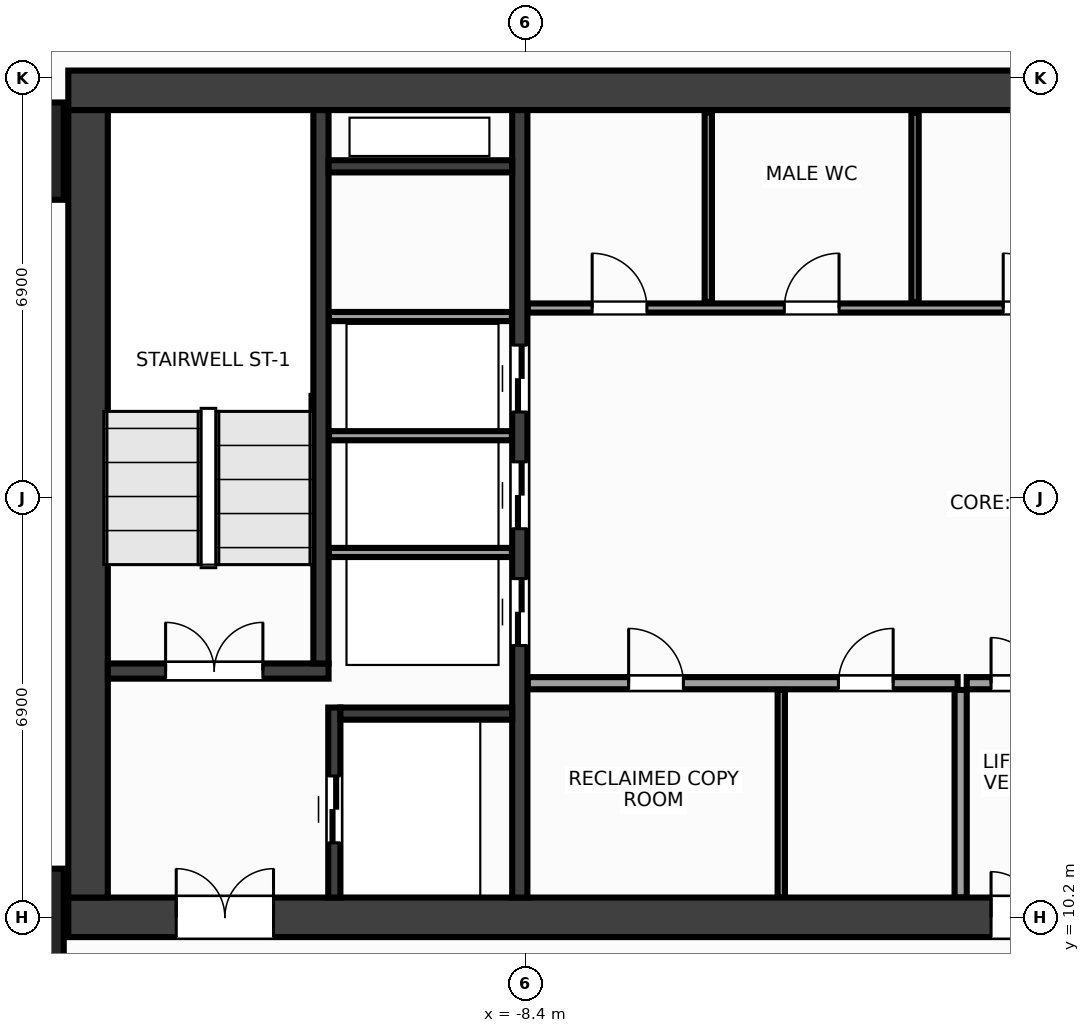
"""IFC4 building model, lengths in metres.
Left out: names, types, materials, properties, quantities, classifications, styles, units other than length and angle.
Written with IfcOpenShell. Run it as: python <this file> out.ifc"""

import sys

from ifc_helpers import new_model, si_unit, direction, frame, frame_2d, origin, origin_2d, place, context, subcontext, project, spatial, rectangle, extrude, source, transform, mapped, element, fill, save


model = new_model("IFC4")
c1 = context("Model", 3, precision=1e-05, world=origin(), true_north=direction((0.0, 1.0)))
c2 = subcontext(c1, "Body", "Model", "MODEL_VIEW")
j1 = project(units=[si_unit("LENGTHUNIT", "METRE"), si_unit("PLANEANGLEUNIT", "RADIAN")], contexts=[c1])
p1 = place(None, origin())
s1 = spatial("IfcSite", under=j1, at=p1, CompositionType="ELEMENT")
p2 = place(p1, origin())
s2 = spatial("IfcBuilding", under=s1, at=p2, CompositionType="ELEMENT")
p3 = place(p2, frame((0.0, 0.0, 164.0)))
s3 = spatial("IfcBuildingStorey", under=s2, at=p3, CompositionType="ELEMENT", Elevation=164.0)
m1 = source(origin(), c2, "Body", "SweptSolid", [
    extrude(rectangle(XDim=31.85, YDim=0.65, at=frame_2d((15.925, 0.0))), origin(), (0.0, 0.0, 1.0), 3.6),
])
p4 = place(p3, frame((-15.925, 23.8, 0.0), z_axis=(0.0, 0.0, 1.0), x_axis=(1.0, 0.0, 0.0)))
e1 = element("IfcWall", 1, at=p4, inside=s3, PredefinedType="SHEAR", context=c2, shape_type="MappedRepresentation", body=[
    mapped(m1, transform((0.0, 0.0, 0.0), x_axis=(1.0, 0.0, 0.0), y_axis=(0.0, 1.0, 0.0), z_axis=(0.0, 0.0, 1.0), scale=1.0)),
])
p5 = place(p3, frame((-15.925, 10.2, 0.0), z_axis=(0.0, 0.0, 1.0), x_axis=(1.0, 0.0, 0.0)))
e2 = element("IfcWall", 2, at=p5, inside=s3, PredefinedType="SHEAR", context=c2, shape_type="MappedRepresentation", body=[
    mapped(m1, transform((0.0, 0.0, 0.0), x_axis=(1.0, 0.0, 0.0), y_axis=(0.0, 1.0, 0.0), z_axis=(0.0, 0.0, 1.0), scale=1.0)),
])
p6 = place(p5, frame((1.775, 0.0, 0.0)))
e3 = element("IfcOpeningElement", 3, at=p6, cuts=e2, PredefinedType="OPENING", context=c2, shape_type="SweptSolid", body=[
    extrude(rectangle(XDim=1.6, YDim=2.15, at=frame_2d((0.8, 1.075))), frame((0.0, 0.337, 0.0), z_axis=(0.0, -1.0, 0.0), x_axis=(1.0, 0.0, 0.0)), (0.0, 0.0, 1.0), 0.674),
])
p7 = place(p5, frame((28.475, 0.0, 0.0)))
e4 = element("IfcOpeningElement", 4, at=p7, cuts=e2, PredefinedType="OPENING", context=c2, shape_type="SweptSolid", body=[
    extrude(rectangle(XDim=1.6, YDim=2.15, at=frame_2d((0.8, 1.075))), frame((0.0, 0.337, 0.0), z_axis=(0.0, -1.0, 0.0), x_axis=(1.0, 0.0, 0.0)), (0.0, 0.0, 1.0), 0.674),
])
p8 = place(p5, frame((15.175, 0.0, 0.0)))
e5 = element("IfcOpeningElement", 5, at=p8, cuts=e2, PredefinedType="OPENING", context=c2, shape_type="SweptSolid", body=[
    extrude(rectangle(XDim=1.5, YDim=2.2, at=frame_2d((0.75, 1.1))), frame((0.0, 0.337, 0.0), z_axis=(0.0, -1.0, 0.0), x_axis=(1.0, 0.0, 0.0)), (0.0, 0.0, 1.0), 0.674),
])
m2 = source(origin(), c2, "Body", "SweptSolid", [
    extrude(rectangle(XDim=12.95, YDim=0.65, at=frame_2d((6.475, 0.0))), origin(), (0.0, 0.0, 1.0), 3.6),
])
p9 = place(p3, frame((-15.6, 10.525, 0.0), z_axis=(0.0, 0.0, 1.0), x_axis=(0.0, 1.0, 0.0)))
e6 = element("IfcWall", 6, at=p9, inside=s3, PredefinedType="SHEAR", context=c2, shape_type="MappedRepresentation", body=[
    mapped(m2, transform((0.0, 0.0, 0.0), x_axis=(1.0, 0.0, 0.0), y_axis=(0.0, 1.0, 0.0), z_axis=(0.0, 0.0, 1.0), scale=1.0)),
])
m3 = source(origin(), c2, "Body", "SweptSolid", [
    extrude(rectangle(XDim=12.95, YDim=0.25, at=frame_2d((6.475, 0.0))), origin(), (0.0, 0.0, 1.0), 3.6),
])
p10 = place(p3, frame((-8.5, 10.525, 0.0), z_axis=(0.0, 0.0, 1.0), x_axis=(0.0, 1.0, 0.0)))
e7 = element("IfcWall", 7, at=p10, inside=s3, PredefinedType="SHEAR", context=c2, shape_type="MappedRepresentation", body=[
    mapped(m3, transform((0.0, 0.0, 0.0), x_axis=(1.0, 0.0, 0.0), y_axis=(0.0, 1.0, 0.0), z_axis=(0.0, 0.0, 1.0), scale=1.0)),
])
p11 = place(p10, frame((4.145, 0.0, 0.0)))
e8 = element("IfcOpeningElement", 8, at=p11, cuts=e7, PredefinedType="OPENING", context=c2, shape_type="SweptSolid", body=[
    extrude(rectangle(XDim=1.1, YDim=2.15, at=frame_2d((0.55, 1.075))), frame((0.0, 0.137, 0.0), z_axis=(0.0, -1.0, 0.0), x_axis=(1.0, 0.0, 0.0)), (0.0, 0.0, 1.0), 0.274),
])
p12 = place(p10, frame((6.065, 0.0, 0.0)))
e9 = element("IfcOpeningElement", 9, at=p12, cuts=e7, PredefinedType="OPENING", context=c2, shape_type="SweptSolid", body=[
    extrude(rectangle(XDim=1.1, YDim=2.15, at=frame_2d((0.55, 1.075))), frame((0.0, 0.137, 0.0), z_axis=(0.0, -1.0, 0.0), x_axis=(1.0, 0.0, 0.0)), (0.0, 0.0, 1.0), 0.274),
])
p13 = place(p10, frame((7.985, 0.0, 0.0)))
e10 = element("IfcOpeningElement", 10, at=p13, cuts=e7, PredefinedType="OPENING", context=c2, shape_type="SweptSolid", body=[
    extrude(rectangle(XDim=1.1, YDim=2.15, at=frame_2d((0.55, 1.075))), frame((0.0, 0.137, 0.0), z_axis=(0.0, -1.0, 0.0), x_axis=(1.0, 0.0, 0.0)), (0.0, 0.0, 1.0), 0.274),
])
m4 = source(origin(), c2, "Body", "SweptSolid", [
    extrude(rectangle(XDim=3.63, YDim=0.25, at=frame_2d((1.815, 0.0))), origin(), (0.0, 0.0, 1.0), 3.6),
])
p14 = place(p3, frame((-15.275, 14.25, 0.0), z_axis=(0.0, 0.0, 1.0), x_axis=(1.0, 0.0, 0.0)))
e11 = element("IfcWall", 11, at=p14, inside=s3, PredefinedType="SHEAR", context=c2, shape_type="MappedRepresentation", body=[
    mapped(m4, transform((0.0, 0.0, 0.0), x_axis=(1.0, 0.0, 0.0), y_axis=(0.0, 1.0, 0.0), z_axis=(0.0, 0.0, 1.0), scale=1.0)),
])
p15 = place(p14, frame((0.95, 0.0, 0.0)))
e12 = element("IfcOpeningElement", 12, at=p15, cuts=e11, PredefinedType="OPENING", context=c2, shape_type="SweptSolid", body=[
    extrude(rectangle(XDim=1.6, YDim=2.15, at=frame_2d((0.8, 1.075))), frame((0.0, 0.137, 0.0), z_axis=(0.0, -1.0, 0.0), x_axis=(1.0, 0.0, 0.0)), (0.0, 0.0, 1.0), 0.274),
])
m5 = source(origin(), c2, "Body", "SweptSolid", [
    extrude(rectangle(XDim=9.1, YDim=0.25, at=frame_2d((4.55, 0.0))), origin(), (0.0, 0.0, 1.0), 3.6),
])
p16 = place(p3, frame((-11.77, 14.375, 0.0), z_axis=(0.0, 0.0, 1.0), x_axis=(0.0, 1.0, 0.0)))
e13 = element("IfcWall", 13, at=p16, inside=s3, PredefinedType="SHEAR", context=c2, shape_type="MappedRepresentation", body=[
    mapped(m5, transform((0.0, 0.0, 0.0), x_axis=(1.0, 0.0, 0.0), y_axis=(0.0, 1.0, 0.0), z_axis=(0.0, 0.0, 1.0), scale=1.0)),
])
m6 = source(origin(), c2, "Body", "SweptSolid", [
    extrude(rectangle(XDim=3.125, YDim=0.2, at=frame_2d((1.562, 0.0))), origin(), (0.0, 0.0, 1.0), 3.6),
])
p17 = place(p3, frame((-11.55, 10.525, 0.0), z_axis=(0.0, 0.0, 1.0), x_axis=(0.0, 1.0, 0.0)))
e14 = element("IfcWall", 14, at=p17, inside=s3, PredefinedType="SHEAR", context=c2, shape_type="MappedRepresentation", body=[
    mapped(m6, transform((0.0, 0.0, 0.0), x_axis=(1.0, 0.0, 0.0), y_axis=(0.0, 1.0, 0.0), z_axis=(0.0, 0.0, 1.0), scale=1.0)),
])
p18 = place(p17, frame((0.9, 0.0, 0.0)))
e15 = element("IfcOpeningElement", 15, at=p18, cuts=e14, PredefinedType="OPENING", context=c2, shape_type="SweptSolid", body=[
    extrude(rectangle(XDim=1.1, YDim=2.15, at=frame_2d((0.55, 1.075))), frame((0.0, 0.112, 0.0), z_axis=(0.0, -1.0, 0.0), x_axis=(1.0, 0.0, 0.0)), (0.0, 0.0, 1.0), 0.224),
])
m7 = source(origin(), c2, "Body", "SweptSolid", [
    extrude(rectangle(XDim=2.825, YDim=0.2, at=frame_2d((1.413, 0.0))), origin(), (0.0, 0.0, 1.0), 3.6),
])
p19 = place(p3, frame((-11.45, 13.55, 0.0), z_axis=(0.0, 0.0, 1.0), x_axis=(1.0, 0.0, 0.0)))
e16 = element("IfcWall", 16, at=p19, inside=s3, PredefinedType="SHEAR", context=c2, shape_type="MappedRepresentation", body=[
    mapped(m7, transform((0.0, 0.0, 0.0), x_axis=(1.0, 0.0, 0.0), y_axis=(0.0, 1.0, 0.0), z_axis=(0.0, 0.0, 1.0), scale=1.0)),
])
m8 = source(origin(), c2, "Body", "SweptSolid", [
    extrude(rectangle(XDim=3.02, YDim=0.2, at=frame_2d((1.51, 0.0))), origin(), (0.0, 0.0, 1.0), 3.6),
])
p20 = place(p3, frame((-11.645, 22.55, 0.0), z_axis=(0.0, 0.0, 1.0), x_axis=(1.0, 0.0, 0.0)))
e17 = element("IfcWall", 17, at=p20, inside=s3, PredefinedType="SHEAR", context=c2, shape_type="MappedRepresentation", body=[
    mapped(m8, transform((0.0, 0.0, 0.0), x_axis=(1.0, 0.0, 0.0), y_axis=(0.0, 1.0, 0.0), z_axis=(0.0, 0.0, 1.0), scale=1.0)),
])
m9 = source(origin(), c2, "Body", "SweptSolid", [
    extrude(rectangle(XDim=1.6, YDim=1.6, at=origin_2d()), origin(), (0.0, 0.0, 1.0), 3.6),
])
for number, where, z_axis, x_axis in (
    (18, (-16.8, 10.2, 0.0), (0.0, 0.0, 1.0), (1.0, 0.0, 0.0)),
    (19, (-16.8, 22.8, 0.0), (0.0, 0.0, 1.0), (1.0, 0.0, 0.0)),
):
    element("IfcColumn", number, at=place(p3, frame(where, z_axis=z_axis, x_axis=x_axis)), inside=s3, PredefinedType="COLUMN", context=c2, shape_type="MappedRepresentation", body=[
        mapped(m9, transform((0.0, 0.0, 0.0), x_axis=(1.0, 0.0, 0.0), y_axis=(0.0, 1.0, 0.0), z_axis=(0.0, 0.0, 1.0), scale=1.0)),
    ])
m10 = source(origin(), c2, "Body", "SweptSolid", [
    extrude(rectangle(XDim=3.01, YDim=0.15, at=frame_2d((1.505, 0.0))), origin(), (0.0, 0.0, 1.0), 3.38),
])
for number, where, z_axis, x_axis in (
    (20, (-11.64, 16.2, 0.0), (0.0, 0.0, 1.0), (1.0, 0.0, 0.0)),
    (21, (-11.64, 18.12, 0.0), (0.0, 0.0, 1.0), (1.0, 0.0, 0.0)),
    (22, (-11.64, 20.08, 0.0), (0.0, 0.0, 1.0), (1.0, 0.0, 0.0)),
):
    element("IfcWall", number, at=place(p3, frame(where, z_axis=z_axis, x_axis=x_axis)), inside=s3, PredefinedType="PARTITIONING", context=c2, shape_type="MappedRepresentation", body=[
        mapped(m10, transform((0.0, 0.0, 0.0), x_axis=(1.0, 0.0, 0.0), y_axis=(0.0, 1.0, 0.0), z_axis=(0.0, 0.0, 1.0), scale=1.0)),
    ])
m11 = source(origin(), c2, "Body", "SweptSolid", [
    extrude(rectangle(XDim=7.07, YDim=0.2, at=frame_2d((3.535, 0.0))), origin(), (0.0, 0.0, 1.0), 3.38),
])
p21 = place(p3, frame((-8.37, 14.05, 0.0), z_axis=(0.0, 0.0, 1.0), x_axis=(1.0, 0.0, 0.0)))
e23 = element("IfcWall", 23, at=p21, inside=s3, PredefinedType="PARTITIONING", context=c2, shape_type="MappedRepresentation", body=[
    mapped(m11, transform((0.0, 0.0, 0.0), x_axis=(1.0, 0.0, 0.0), y_axis=(0.0, 1.0, 0.0), z_axis=(0.0, 0.0, 1.0), scale=1.0)),
])
p22 = place(p21, frame((1.66, 0.0, 0.0)))
e24 = element("IfcOpeningElement", 24, at=p22, cuts=e23, PredefinedType="OPENING", context=c2, shape_type="SweptSolid", body=[
    extrude(rectangle(XDim=0.9, YDim=2.15, at=frame_2d((0.45, 1.075))), frame((0.0, 0.112, 0.0), z_axis=(0.0, -1.0, 0.0), x_axis=(1.0, 0.0, 0.0)), (0.0, 0.0, 1.0), 0.224),
])
p23 = place(p21, frame((5.11, 0.0, 0.0)))
e25 = element("IfcOpeningElement", 25, at=p23, cuts=e23, PredefinedType="OPENING", context=c2, shape_type="SweptSolid", body=[
    extrude(rectangle(XDim=0.9, YDim=2.15, at=frame_2d((0.45, 1.075))), frame((0.0, 0.112, 0.0), z_axis=(0.0, -1.0, 0.0), x_axis=(1.0, 0.0, 0.0)), (0.0, 0.0, 1.0), 0.224),
])
m12 = source(origin(), c2, "Body", "SweptSolid", [
    extrude(rectangle(XDim=3.415, YDim=0.2, at=frame_2d((1.708, 0.0))), origin(), (0.0, 0.0, 1.0), 3.38),
])
p24 = place(p3, frame((-1.25, 10.525, 0.0), z_axis=(0.0, 0.0, 1.0), x_axis=(0.0, 1.0, 0.0)))
e26 = element("IfcWall", 26, at=p24, inside=s3, PredefinedType="PARTITIONING", context=c2, shape_type="MappedRepresentation", body=[
    mapped(m12, transform((0.0, 0.0, 0.0), x_axis=(1.0, 0.0, 0.0), y_axis=(0.0, 1.0, 0.0), z_axis=(0.0, 0.0, 1.0), scale=1.0)),
])
m13 = source(origin(), c2, "Body", "SweptSolid", [
    extrude(rectangle(XDim=2.3, YDim=0.2, at=frame_2d((1.15, 0.0))), origin(), (0.0, 0.0, 1.0), 3.38),
])
p25 = place(p3, frame((-1.15, 14.05, 0.0), z_axis=(0.0, 0.0, 1.0), x_axis=(1.0, 0.0, 0.0)))
e27 = element("IfcWall", 27, at=p25, inside=s3, PredefinedType="PARTITIONING", context=c2, shape_type="MappedRepresentation", body=[
    mapped(m13, transform((0.0, 0.0, 0.0), x_axis=(1.0, 0.0, 0.0), y_axis=(0.0, 1.0, 0.0), z_axis=(0.0, 0.0, 1.0), scale=1.0)),
])
p26 = place(p25, frame((0.4, 0.0, 0.0)))
e28 = element("IfcOpeningElement", 28, at=p26, cuts=e27, PredefinedType="OPENING", context=c2, shape_type="SweptSolid", body=[
    extrude(rectangle(XDim=1.5, YDim=2.2, at=frame_2d((0.75, 1.1))), frame((0.0, 0.112, 0.0), z_axis=(0.0, -1.0, 0.0), x_axis=(1.0, 0.0, 0.0)), (0.0, 0.0, 1.0), 0.224),
])
m14 = source(origin(), c2, "Body", "SweptSolid", [
    extrude(rectangle(XDim=14.59, YDim=0.15, at=frame_2d((7.295, 0.0))), origin(), (0.0, 0.0, 1.0), 3.38),
])
p27 = place(p3, frame((-8.37, 20.22, 0.0), z_axis=(0.0, 0.0, 1.0), x_axis=(1.0, 0.0, 0.0)))
e29 = element("IfcWall", 29, at=p27, inside=s3, PredefinedType="PARTITIONING", context=c2, shape_type="MappedRepresentation", body=[
    mapped(m14, transform((0.0, 0.0, 0.0), x_axis=(1.0, 0.0, 0.0), y_axis=(0.0, 1.0, 0.0), z_axis=(0.0, 0.0, 1.0), scale=1.0)),
])
p28 = place(p27, frame((1.06, 0.0, 0.0)))
e30 = element("IfcOpeningElement", 30, at=p28, cuts=e29, PredefinedType="OPENING", context=c2, shape_type="SweptSolid", body=[
    extrude(rectangle(XDim=0.9, YDim=2.15, at=frame_2d((0.45, 1.075))), frame((0.0, 0.087, 0.0), z_axis=(0.0, -1.0, 0.0), x_axis=(1.0, 0.0, 0.0)), (0.0, 0.0, 1.0), 0.174),
])
p29 = place(p27, frame((4.22, 0.0, 0.0)))
e31 = element("IfcOpeningElement", 31, at=p29, cuts=e29, PredefinedType="OPENING", context=c2, shape_type="SweptSolid", body=[
    extrude(rectangle(XDim=0.9, YDim=2.15, at=frame_2d((0.45, 1.075))), frame((0.0, 0.087, 0.0), z_axis=(0.0, -1.0, 0.0), x_axis=(1.0, 0.0, 0.0)), (0.0, 0.0, 1.0), 0.174),
])
p30 = place(p27, frame((7.82, 0.0, 0.0)))
e32 = element("IfcOpeningElement", 32, at=p30, cuts=e29, PredefinedType="OPENING", context=c2, shape_type="SweptSolid", body=[
    extrude(rectangle(XDim=0.9, YDim=2.15, at=frame_2d((0.45, 1.075))), frame((0.0, 0.087, 0.0), z_axis=(0.0, -1.0, 0.0), x_axis=(1.0, 0.0, 0.0)), (0.0, 0.0, 1.0), 0.174),
])
p31 = place(p27, frame((11.87, 0.0, 0.0)))
e33 = element("IfcOpeningElement", 33, at=p31, cuts=e29, PredefinedType="OPENING", context=c2, shape_type="SweptSolid", body=[
    extrude(rectangle(XDim=0.9, YDim=2.15, at=frame_2d((0.45, 1.075))), frame((0.0, 0.087, 0.0), z_axis=(0.0, -1.0, 0.0), x_axis=(1.0, 0.0, 0.0)), (0.0, 0.0, 1.0), 0.174),
])
m15 = source(origin(), c2, "Body", "SweptSolid", [
    extrude(rectangle(XDim=3.415, YDim=0.12, at=frame_2d((1.708, 0.0))), origin(), (0.0, 0.0, 1.0), 3.38),
])
p32 = place(p3, frame((-4.2, 10.525, 0.0), z_axis=(0.0, 0.0, 1.0), x_axis=(0.0, 1.0, 0.0)))
e34 = element("IfcWall", 34, at=p32, inside=s3, PredefinedType="PARTITIONING", context=c2, shape_type="MappedRepresentation", body=[
    mapped(m15, transform((0.0, 0.0, 0.0), x_axis=(1.0, 0.0, 0.0), y_axis=(0.0, 1.0, 0.0), z_axis=(0.0, 0.0, 1.0), scale=1.0)),
])
m16 = source(origin(), c2, "Body", "SweptSolid", [
    extrude(rectangle(XDim=3.115, YDim=0.12, at=frame_2d((1.558, 0.0))), origin(), (0.0, 0.0, 1.0), 3.38),
])
for number, where, z_axis, x_axis in (
    (35, (-5.4, 20.32, 0.0), (0.0, 0.0, 1.0), (0.0, 1.0, 0.0)),
    (36, (-2.0, 20.32, 0.0), (0.0, 0.0, 1.0), (0.0, 1.0, 0.0)),
):
    element("IfcWall", number, at=place(p3, frame(where, z_axis=z_axis, x_axis=x_axis)), inside=s3, PredefinedType="PARTITIONING", context=c2, shape_type="MappedRepresentation", body=[
        mapped(m16, transform((0.0, 0.0, 0.0), x_axis=(1.0, 0.0, 0.0), y_axis=(0.0, 1.0, 0.0), z_axis=(0.0, 0.0, 1.0), scale=1.0)),
    ])
m17 = source(origin(), c2, "Body", "SweptSolid", [
    extrude(rectangle(XDim=1.6, YDim=2.15, at=frame_2d((0.8, 1.075))), frame((0.0, 0.025, 0.0), z_axis=(0.0, -1.0, 0.0), x_axis=(1.0, 0.0, 0.0)), (0.0, 0.0, 1.0), 0.05),
])
p33 = place(p15, origin())
e37 = element("IfcDoor", 37, at=p33, inside=s3, OperationType="DOUBLE_DOOR_SINGLE_SWING", PredefinedType="DOOR", context=c2, shape_type="MappedRepresentation", body=[
    mapped(m17, transform((0.0, 0.0, 0.0), x_axis=(1.0, 0.0, 0.0), y_axis=(0.0, 1.0, 0.0), z_axis=(0.0, 0.0, 1.0), scale=1.0)),
])
fill(e12, e37)
p34 = place(p6, origin())
e38 = element("IfcDoor", 38, at=p34, inside=s3, OperationType="DOUBLE_DOOR_SINGLE_SWING", PredefinedType="DOOR", context=c2, shape_type="MappedRepresentation", body=[
    mapped(m17, transform((0.0, 0.0, 0.0), x_axis=(1.0, 0.0, 0.0), y_axis=(0.0, 1.0, 0.0), z_axis=(0.0, 0.0, 1.0), scale=1.0)),
])
fill(e3, e38)
m18 = source(origin(), c2, "Body", "SweptSolid", [
    extrude(rectangle(XDim=1.1, YDim=2.15, at=frame_2d((0.55, 1.075))), frame((0.0, 0.025, 0.0), z_axis=(0.0, -1.0, 0.0), x_axis=(1.0, 0.0, 0.0)), (0.0, 0.0, 1.0), 0.05),
])
p35 = place(p18, origin())
e39 = element("IfcDoor", 39, at=p35, inside=s3, OperationType="DOUBLE_DOOR_SLIDING", PredefinedType="DOOR", context=c2, shape_type="MappedRepresentation", body=[
    mapped(m18, transform((0.0, 0.0, 0.0), x_axis=(1.0, 0.0, 0.0), y_axis=(0.0, 1.0, 0.0), z_axis=(0.0, 0.0, 1.0), scale=1.0)),
])
fill(e15, e39)
p36 = place(p11, origin())
e40 = element("IfcDoor", 40, at=p36, inside=s3, OperationType="DOUBLE_DOOR_SLIDING", PredefinedType="DOOR", context=c2, shape_type="MappedRepresentation", body=[
    mapped(m18, transform((0.0, 0.0, 0.0), x_axis=(1.0, 0.0, 0.0), y_axis=(0.0, 1.0, 0.0), z_axis=(0.0, 0.0, 1.0), scale=1.0)),
])
fill(e8, e40)
p37 = place(p12, origin())
e41 = element("IfcDoor", 41, at=p37, inside=s3, OperationType="DOUBLE_DOOR_SLIDING", PredefinedType="DOOR", context=c2, shape_type="MappedRepresentation", body=[
    mapped(m18, transform((0.0, 0.0, 0.0), x_axis=(1.0, 0.0, 0.0), y_axis=(0.0, 1.0, 0.0), z_axis=(0.0, 0.0, 1.0), scale=1.0)),
])
fill(e9, e41)
p38 = place(p13, origin())
e42 = element("IfcDoor", 42, at=p38, inside=s3, OperationType="DOUBLE_DOOR_SLIDING", PredefinedType="DOOR", context=c2, shape_type="MappedRepresentation", body=[
    mapped(m18, transform((0.0, 0.0, 0.0), x_axis=(1.0, 0.0, 0.0), y_axis=(0.0, 1.0, 0.0), z_axis=(0.0, 0.0, 1.0), scale=1.0)),
])
fill(e10, e42)
m19 = source(origin(), c2, "Body", "SweptSolid", [
    extrude(rectangle(XDim=0.9, YDim=2.15, at=frame_2d((0.45, 1.075))), frame((0.0, 0.025, 0.0), z_axis=(0.0, -1.0, 0.0), x_axis=(1.0, 0.0, 0.0)), (0.0, 0.0, 1.0), 0.05),
])
p39 = place(p22, origin())
e43 = element("IfcDoor", 43, at=p39, inside=s3, OperationType="SINGLE_SWING_LEFT", PredefinedType="DOOR", context=c2, shape_type="MappedRepresentation", body=[
    mapped(m19, transform((0.0, 0.0, 0.0), x_axis=(1.0, 0.0, 0.0), y_axis=(0.0, 1.0, 0.0), z_axis=(0.0, 0.0, 1.0), scale=1.0)),
])
fill(e24, e43)
p40 = place(p23, origin())
e44 = element("IfcDoor", 44, at=p40, inside=s3, OperationType="SINGLE_SWING_RIGHT", PredefinedType="DOOR", context=c2, shape_type="MappedRepresentation", body=[
    mapped(m19, transform((0.0, 0.0, 0.0), x_axis=(1.0, 0.0, 0.0), y_axis=(0.0, 1.0, 0.0), z_axis=(0.0, 0.0, 1.0), scale=1.0)),
])
fill(e25, e44)
m20 = source(origin(), c2, "Body", "SweptSolid", [
    extrude(rectangle(XDim=1.5, YDim=2.2, at=frame_2d((0.75, 1.1))), frame((0.0, 0.025, 0.0), z_axis=(0.0, -1.0, 0.0), x_axis=(1.0, 0.0, 0.0)), (0.0, 0.0, 1.0), 0.05),
])
p41 = place(p26, origin())
e45 = element("IfcDoor", 45, at=p41, inside=s3, OperationType="DOUBLE_DOOR_SINGLE_SWING", PredefinedType="DOOR", context=c2, shape_type="MappedRepresentation", body=[
    mapped(m20, transform((0.0, 0.0, 0.0), x_axis=(1.0, 0.0, 0.0), y_axis=(0.0, 1.0, 0.0), z_axis=(0.0, 0.0, 1.0), scale=1.0)),
])
fill(e28, e45)
p42 = place(p8, origin())
e46 = element("IfcDoor", 46, at=p42, inside=s3, OperationType="DOUBLE_DOOR_SINGLE_SWING", PredefinedType="DOOR", context=c2, shape_type="MappedRepresentation", body=[
    mapped(m20, transform((0.0, 0.0, 0.0), x_axis=(1.0, 0.0, 0.0), y_axis=(0.0, 1.0, 0.0), z_axis=(0.0, 0.0, 1.0), scale=1.0)),
])
fill(e5, e46)
p43 = place(p28, origin())
e47 = element("IfcDoor", 47, at=p43, inside=s3, OperationType="SINGLE_SWING_LEFT", PredefinedType="DOOR", context=c2, shape_type="MappedRepresentation", body=[
    mapped(m19, transform((0.0, 0.0, 0.0), x_axis=(1.0, 0.0, 0.0), y_axis=(0.0, 1.0, 0.0), z_axis=(0.0, 0.0, 1.0), scale=1.0)),
])
fill(e30, e47)
p44 = place(p29, origin())
e48 = element("IfcDoor", 48, at=p44, inside=s3, OperationType="SINGLE_SWING_RIGHT", PredefinedType="DOOR", context=c2, shape_type="MappedRepresentation", body=[
    mapped(m19, transform((0.0, 0.0, 0.0), x_axis=(1.0, 0.0, 0.0), y_axis=(0.0, 1.0, 0.0), z_axis=(0.0, 0.0, 1.0), scale=1.0)),
])
fill(e31, e48)
p45 = place(p30, origin())
e49 = element("IfcDoor", 49, at=p45, inside=s3, OperationType="SINGLE_SWING_LEFT", PredefinedType="DOOR", context=c2, shape_type="MappedRepresentation", body=[
    mapped(m19, transform((0.0, 0.0, 0.0), x_axis=(1.0, 0.0, 0.0), y_axis=(0.0, 1.0, 0.0), z_axis=(0.0, 0.0, 1.0), scale=1.0)),
])
fill(e32, e49)
save(model, sys.argv[1])
